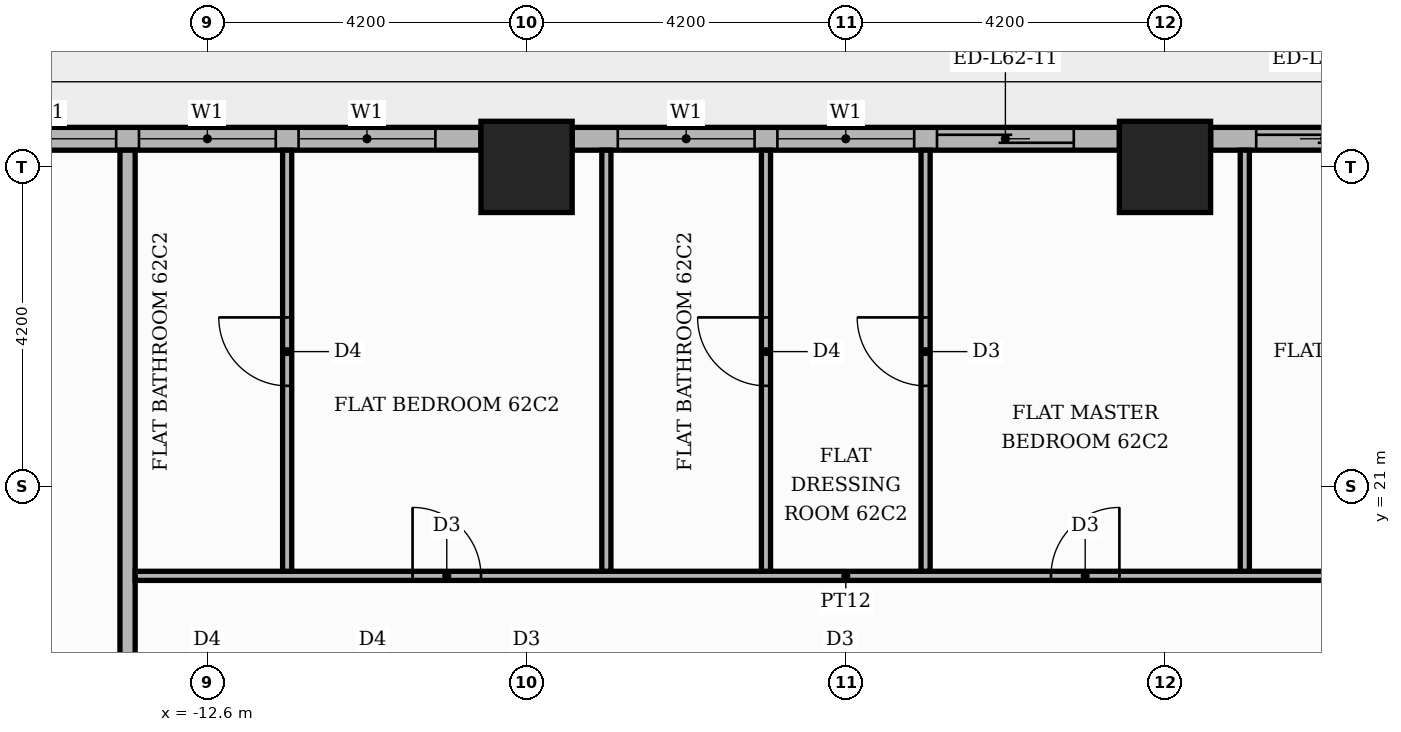
"""IFC4 building model, lengths in metres.
Left out: names, types, materials, properties, quantities, classifications, styles, units other than length and angle.
Written with IfcOpenShell. Run it as: python <this file> out.ifc"""

import sys

from ifc_helpers import new_model, si_unit, direction, frame, frame_2d, origin, origin_2d, place, context, subcontext, project, spatial, rectangle, extrude, element, fill, save


model = new_model("IFC4")
c1 = context("Model", 3, precision=1e-05, world=origin(), true_north=direction((0.0, 1.0)))
c2 = subcontext(c1, "Body", "Model", "MODEL_VIEW")
j1 = project(units=[si_unit("LENGTHUNIT", "METRE"), si_unit("PLANEANGLEUNIT", "RADIAN")], contexts=[c1])
p1 = place(None, origin())
s1 = spatial("IfcSite", under=j1, at=p1, CompositionType="ELEMENT")
p2 = place(p1, origin())
s2 = spatial("IfcBuilding", under=s1, at=p2, CompositionType="ELEMENT")
p3 = place(p2, frame((0.0, 0.0, 260.1)))
s3 = spatial("IfcBuildingStorey", under=s2, at=p3, CompositionType="ELEMENT", Elevation=260.1)
for number, where, z_axis, x_axis in (
    (1, (0.0, 25.2, 0.0), (0.0, 0.0, 1.0), (1.0, 0.0, 0.0)),
    (2, (-8.4, 25.2, 0.0), (0.0, 0.0, 1.0), (1.0, 0.0, 0.0)),
):
    element("IfcColumn", number, at=place(p3, frame(where, z_axis=z_axis, x_axis=x_axis)), inside=s3, PredefinedType="COLUMN", context=c2, shape_type="SweptSolid", body=[
        extrude(rectangle(XDim=1.2, YDim=1.2, at=origin_2d()), origin(), (0.0, 0.0, 1.0), 3.9),
    ])
p4 = place(p3, frame((7.8, 25.57, 0.0), z_axis=(0.0, 0.0, 1.0), x_axis=(-1.0, 0.0, 0.0)))
e3 = element("IfcWall", 3, at=p4, inside=s3, PredefinedType="STANDARD", context=c2, shape_type="SweptSolid", body=[
    extrude(rectangle(XDim=7.2, YDim=0.3, at=frame_2d((3.6, 0.0))), origin(), (0.0, 0.0, 1.0), 3.48),
])
p5 = place(p4, frame((0.6, 0.0, 0.9)))
e4 = element("IfcOpeningElement", 4, at=p5, cuts=e3, PredefinedType="OPENING", context=c2, shape_type="SweptSolid", body=[
    extrude(rectangle(XDim=1.8, YDim=2.1, at=frame_2d((0.9, 1.05))), frame((0.0, 0.16, 0.0), z_axis=(0.0, -1.0, 0.0), x_axis=(1.0, 0.0, 0.0)), (0.0, 0.0, 1.0), 0.32),
])
p6 = place(p4, frame((2.7, 0.0, 0.9)))
e5 = element("IfcOpeningElement", 5, at=p6, cuts=e3, PredefinedType="OPENING", context=c2, shape_type="SweptSolid", body=[
    extrude(rectangle(XDim=1.8, YDim=2.1, at=frame_2d((0.9, 1.05))), frame((0.0, 0.16, 0.0), z_axis=(0.0, -1.0, 0.0), x_axis=(1.0, 0.0, 0.0)), (0.0, 0.0, 1.0), 0.32),
])
p7 = place(p4, frame((4.8, 0.0, 0.0)))
e6 = element("IfcOpeningElement", 6, at=p7, cuts=e3, PredefinedType="OPENING", context=c2, shape_type="SweptSolid", body=[
    extrude(rectangle(XDim=1.8, YDim=2.4, at=frame_2d((0.9, 1.2))), frame((0.0, 0.16, 0.0), z_axis=(0.0, -1.0, 0.0), x_axis=(1.0, 0.0, 0.0)), (0.0, 0.0, 1.0), 0.32),
])
p8 = place(p3, frame((-0.6, 25.57, 0.0), z_axis=(0.0, 0.0, 1.0), x_axis=(-1.0, 0.0, 0.0)))
e7 = element("IfcWall", 7, at=p8, inside=s3, PredefinedType="STANDARD", context=c2, shape_type="SweptSolid", body=[
    extrude(rectangle(XDim=7.2, YDim=0.3, at=frame_2d((3.6, 0.0))), origin(), (0.0, 0.0, 1.0), 3.48),
])
p9 = place(p8, frame((0.6, 0.0, 0.0)))
e8 = element("IfcOpeningElement", 8, at=p9, cuts=e7, PredefinedType="OPENING", context=c2, shape_type="SweptSolid", body=[
    extrude(rectangle(XDim=1.8, YDim=2.4, at=frame_2d((0.9, 1.2))), frame((0.0, 0.16, 0.0), z_axis=(0.0, -1.0, 0.0), x_axis=(1.0, 0.0, 0.0)), (0.0, 0.0, 1.0), 0.32),
])
p10 = place(p8, frame((2.7, 0.0, 0.9)))
e9 = element("IfcOpeningElement", 9, at=p10, cuts=e7, PredefinedType="OPENING", context=c2, shape_type="SweptSolid", body=[
    extrude(rectangle(XDim=1.8, YDim=2.1, at=frame_2d((0.9, 1.05))), frame((0.0, 0.16, 0.0), z_axis=(0.0, -1.0, 0.0), x_axis=(1.0, 0.0, 0.0)), (0.0, 0.0, 1.0), 0.32),
])
p11 = place(p8, frame((4.8, 0.0, 0.9)))
e10 = element("IfcOpeningElement", 10, at=p11, cuts=e7, PredefinedType="OPENING", context=c2, shape_type="SweptSolid", body=[
    extrude(rectangle(XDim=1.8, YDim=2.1, at=frame_2d((0.9, 1.05))), frame((0.0, 0.16, 0.0), z_axis=(0.0, -1.0, 0.0), x_axis=(1.0, 0.0, 0.0)), (0.0, 0.0, 1.0), 0.32),
])
p12 = place(p3, frame((-9.0, 25.57, 0.0), z_axis=(0.0, 0.0, 1.0), x_axis=(-1.0, 0.0, 0.0)))
e11 = element("IfcWall", 11, at=p12, inside=s3, PredefinedType="STANDARD", context=c2, shape_type="SweptSolid", body=[
    extrude(rectangle(XDim=7.2, YDim=0.3, at=frame_2d((3.6, 0.0))), origin(), (0.0, 0.0, 1.0), 3.48),
])
p13 = place(p12, frame((0.6, 0.0, 0.9)))
e12 = element("IfcOpeningElement", 12, at=p13, cuts=e11, PredefinedType="OPENING", context=c2, shape_type="SweptSolid", body=[
    extrude(rectangle(XDim=1.8, YDim=2.1, at=frame_2d((0.9, 1.05))), frame((0.0, 0.16, 0.0), z_axis=(0.0, -1.0, 0.0), x_axis=(1.0, 0.0, 0.0)), (0.0, 0.0, 1.0), 0.32),
])
p14 = place(p12, frame((2.7, 0.0, 0.9)))
e13 = element("IfcOpeningElement", 13, at=p14, cuts=e11, PredefinedType="OPENING", context=c2, shape_type="SweptSolid", body=[
    extrude(rectangle(XDim=1.8, YDim=2.1, at=frame_2d((0.9, 1.05))), frame((0.0, 0.16, 0.0), z_axis=(0.0, -1.0, 0.0), x_axis=(1.0, 0.0, 0.0)), (0.0, 0.0, 1.0), 0.32),
])
p15 = place(p12, frame((4.8, 0.0, 0.9)))
e14 = element("IfcOpeningElement", 14, at=p15, cuts=e11, PredefinedType="OPENING", context=c2, shape_type="SweptSolid", body=[
    extrude(rectangle(XDim=1.8, YDim=2.1, at=frame_2d((0.9, 1.05))), frame((0.0, 0.16, 0.0), z_axis=(0.0, -1.0, 0.0), x_axis=(1.0, 0.0, 0.0)), (0.0, 0.0, 1.0), 0.32),
])
p16 = place(p3, frame((-13.65, 13.75, 0.0), z_axis=(0.0, 0.0, 1.0), x_axis=(0.0, 1.0, 0.0)))
e15 = element("IfcWall", 15, at=p16, inside=s3, PredefinedType="PARTITIONING", context=c2, shape_type="SweptSolid", body=[
    extrude(rectangle(XDim=11.67, YDim=0.2, at=frame_2d((5.835, 0.0))), origin(), (0.0, 0.0, 1.0), 3.48),
])
p17 = place(p3, frame((-13.55, 19.82, 0.0), z_axis=(0.0, 0.0, 1.0), x_axis=(1.0, 0.0, 0.0)))
e16 = element("IfcWall", 16, at=p17, inside=s3, PredefinedType="PARTITIONING", context=c2, shape_type="SweptSolid", body=[
    extrude(rectangle(XDim=18.7, YDim=0.12, at=frame_2d((9.35, 0.0))), origin(), (0.0, 0.0, 1.0), 3.48),
])
p18 = place(p17, frame((16.2, 0.0, 0.0)))
e17 = element("IfcOpeningElement", 17, at=p18, cuts=e16, PredefinedType="OPENING", context=c2, shape_type="SweptSolid", body=[
    extrude(rectangle(XDim=1.0, YDim=2.1, at=frame_2d((0.5, 1.05))), frame((0.0, 0.07, 0.0), z_axis=(0.0, -1.0, 0.0), x_axis=(1.0, 0.0, 0.0)), (0.0, 0.0, 1.0), 0.14),
])
p19 = place(p17, frame((12.05, 0.0, 0.0)))
e18 = element("IfcOpeningElement", 18, at=p19, cuts=e16, PredefinedType="OPENING", context=c2, shape_type="SweptSolid", body=[
    extrude(rectangle(XDim=0.9, YDim=2.1, at=frame_2d((0.45, 1.05))), frame((0.0, 0.07, 0.0), z_axis=(0.0, -1.0, 0.0), x_axis=(1.0, 0.0, 0.0)), (0.0, 0.0, 1.0), 0.14),
])
p20 = place(p17, frame((3.65, 0.0, 0.0)))
e19 = element("IfcOpeningElement", 19, at=p20, cuts=e16, PredefinedType="OPENING", context=c2, shape_type="SweptSolid", body=[
    extrude(rectangle(XDim=0.9, YDim=2.1, at=frame_2d((0.45, 1.05))), frame((0.0, 0.07, 0.0), z_axis=(0.0, -1.0, 0.0), x_axis=(1.0, 0.0, 0.0)), (0.0, 0.0, 1.0), 0.14),
])
p21 = place(p3, frame((-11.55, 19.88, 0.0), z_axis=(0.0, 0.0, 1.0), x_axis=(0.0, 1.0, 0.0)))
e20 = element("IfcWall", 20, at=p21, inside=s3, PredefinedType="PARTITIONING", context=c2, shape_type="SweptSolid", body=[
    extrude(rectangle(XDim=5.54, YDim=0.12, at=frame_2d((2.77, 0.0))), origin(), (0.0, 0.0, 1.0), 3.48),
])
p22 = place(p21, frame((2.44, 0.0, 0.0)))
e21 = element("IfcOpeningElement", 21, at=p22, cuts=e20, PredefinedType="OPENING", context=c2, shape_type="SweptSolid", body=[
    extrude(rectangle(XDim=0.9, YDim=2.1, at=frame_2d((0.45, 1.05))), frame((0.0, 0.07, 0.0), z_axis=(0.0, -1.0, 0.0), x_axis=(1.0, 0.0, 0.0)), (0.0, 0.0, 1.0), 0.14),
])
p23 = place(p3, frame((-7.35, 19.88, 0.0), z_axis=(0.0, 0.0, 1.0), x_axis=(0.0, 1.0, 0.0)))
e22 = element("IfcWall", 22, at=p23, inside=s3, PredefinedType="PARTITIONING", context=c2, shape_type="SweptSolid", body=[
    extrude(rectangle(XDim=5.54, YDim=0.12, at=frame_2d((2.77, 0.0))), origin(), (0.0, 0.0, 1.0), 3.48),
])
p24 = place(p3, frame((-5.25, 19.88, 0.0), z_axis=(0.0, 0.0, 1.0), x_axis=(0.0, 1.0, 0.0)))
e23 = element("IfcWall", 23, at=p24, inside=s3, PredefinedType="PARTITIONING", context=c2, shape_type="SweptSolid", body=[
    extrude(rectangle(XDim=5.54, YDim=0.12, at=frame_2d((2.77, 0.0))), origin(), (0.0, 0.0, 1.0), 3.48),
])
p25 = place(p24, frame((2.44, 0.0, 0.0)))
e24 = element("IfcOpeningElement", 24, at=p25, cuts=e23, PredefinedType="OPENING", context=c2, shape_type="SweptSolid", body=[
    extrude(rectangle(XDim=0.9, YDim=2.1, at=frame_2d((0.45, 1.05))), frame((0.0, 0.07, 0.0), z_axis=(0.0, -1.0, 0.0), x_axis=(1.0, 0.0, 0.0)), (0.0, 0.0, 1.0), 0.14),
])
p26 = place(p3, frame((-3.15, 19.88, 0.0), z_axis=(0.0, 0.0, 1.0), x_axis=(0.0, 1.0, 0.0)))
e25 = element("IfcWall", 25, at=p26, inside=s3, PredefinedType="PARTITIONING", context=c2, shape_type="SweptSolid", body=[
    extrude(rectangle(XDim=5.54, YDim=0.12, at=frame_2d((2.77, 0.0))), origin(), (0.0, 0.0, 1.0), 3.48),
])
p27 = place(p26, frame((2.44, 0.0, 0.0)))
e26 = element("IfcOpeningElement", 26, at=p27, cuts=e25, PredefinedType="OPENING", context=c2, shape_type="SweptSolid", body=[
    extrude(rectangle(XDim=0.9, YDim=2.1, at=frame_2d((0.45, 1.05))), frame((0.0, 0.07, 0.0), z_axis=(0.0, -1.0, 0.0), x_axis=(1.0, 0.0, 0.0)), (0.0, 0.0, 1.0), 0.14),
])
p28 = place(p3, frame((1.05, 19.88, 0.0), z_axis=(0.0, 0.0, 1.0), x_axis=(0.0, 1.0, 0.0)))
e27 = element("IfcWall", 27, at=p28, inside=s3, PredefinedType="PARTITIONING", context=c2, shape_type="SweptSolid", body=[
    extrude(rectangle(XDim=5.54, YDim=0.12, at=frame_2d((2.77, 0.0))), origin(), (0.0, 0.0, 1.0), 3.48),
])
p29 = place(p7, origin())
e28 = element("IfcDoor", 28, at=p29, inside=s3, OperationType="SLIDING_TO_RIGHT", PredefinedType="DOOR", context=c2, shape_type="SweptSolid", body=[
    extrude(rectangle(XDim=1.8, YDim=2.4, at=frame_2d((0.9, 1.2))), frame((0.0, 0.025, 0.0), z_axis=(0.0, -1.0, 0.0), x_axis=(1.0, 0.0, 0.0)), (0.0, 0.0, 1.0), 0.05),
])
fill(e6, e28)
p30 = place(p9, origin())
e29 = element("IfcDoor", 29, at=p30, inside=s3, OperationType="SLIDING_TO_LEFT", PredefinedType="DOOR", context=c2, shape_type="SweptSolid", body=[
    extrude(rectangle(XDim=1.8, YDim=2.4, at=frame_2d((0.9, 1.2))), frame((0.0, 0.025, 0.0), z_axis=(0.0, -1.0, 0.0), x_axis=(1.0, 0.0, 0.0)), (0.0, 0.0, 1.0), 0.05),
])
fill(e8, e29)
p31 = place(p10, origin())
e30 = element("IfcWindow", 30, at=p31, inside=s3, PartitioningType="SINGLE_PANEL", PredefinedType="WINDOW", context=c2, shape_type="SweptSolid", body=[
    extrude(rectangle(XDim=1.8, YDim=2.1, at=frame_2d((0.9, 1.05))), frame((0.0, 0.03, 0.0), z_axis=(0.0, -1.0, 0.0), x_axis=(1.0, 0.0, 0.0)), (0.0, 0.0, 1.0), 0.06),
])
fill(e9, e30)
p32 = place(p11, origin())
e31 = element("IfcWindow", 31, at=p32, inside=s3, PartitioningType="SINGLE_PANEL", PredefinedType="WINDOW", context=c2, shape_type="SweptSolid", body=[
    extrude(rectangle(XDim=1.8, YDim=2.1, at=frame_2d((0.9, 1.05))), frame((0.0, 0.03, 0.0), z_axis=(0.0, -1.0, 0.0), x_axis=(1.0, 0.0, 0.0)), (0.0, 0.0, 1.0), 0.06),
])
fill(e10, e31)
p33 = place(p13, origin())
e32 = element("IfcWindow", 32, at=p33, inside=s3, PartitioningType="SINGLE_PANEL", PredefinedType="WINDOW", context=c2, shape_type="SweptSolid", body=[
    extrude(rectangle(XDim=1.8, YDim=2.1, at=frame_2d((0.9, 1.05))), frame((0.0, 0.03, 0.0), z_axis=(0.0, -1.0, 0.0), x_axis=(1.0, 0.0, 0.0)), (0.0, 0.0, 1.0), 0.06),
])
fill(e12, e32)
p34 = place(p14, origin())
e33 = element("IfcWindow", 33, at=p34, inside=s3, PartitioningType="SINGLE_PANEL", PredefinedType="WINDOW", context=c2, shape_type="SweptSolid", body=[
    extrude(rectangle(XDim=1.8, YDim=2.1, at=frame_2d((0.9, 1.05))), frame((0.0, 0.03, 0.0), z_axis=(0.0, -1.0, 0.0), x_axis=(1.0, 0.0, 0.0)), (0.0, 0.0, 1.0), 0.06),
])
fill(e13, e33)
p35 = place(p15, origin())
e34 = element("IfcWindow", 34, at=p35, inside=s3, PartitioningType="SINGLE_PANEL", PredefinedType="WINDOW", context=c2, shape_type="SweptSolid", body=[
    extrude(rectangle(XDim=1.8, YDim=2.1, at=frame_2d((0.9, 1.05))), frame((0.0, 0.03, 0.0), z_axis=(0.0, -1.0, 0.0), x_axis=(1.0, 0.0, 0.0)), (0.0, 0.0, 1.0), 0.06),
])
fill(e14, e34)
p36 = place(p19, origin())
e35 = element("IfcDoor", 35, at=p36, inside=s3, OperationType="SINGLE_SWING_RIGHT", PredefinedType="DOOR", context=c2, shape_type="SweptSolid", body=[
    extrude(rectangle(XDim=0.9, YDim=2.1, at=frame_2d((0.45, 1.05))), frame((0.0, 0.025, 0.0), z_axis=(0.0, -1.0, 0.0), x_axis=(1.0, 0.0, 0.0)), (0.0, 0.0, 1.0), 0.05),
])
fill(e18, e35)
p37 = place(p27, origin())
e36 = element("IfcDoor", 36, at=p37, inside=s3, OperationType="SINGLE_SWING_RIGHT", PredefinedType="DOOR", context=c2, shape_type="SweptSolid", body=[
    extrude(rectangle(XDim=0.9, YDim=2.1, at=frame_2d((0.45, 1.05))), frame((0.0, 0.025, 0.0), z_axis=(0.0, -1.0, 0.0), x_axis=(1.0, 0.0, 0.0)), (0.0, 0.0, 1.0), 0.05),
])
fill(e26, e36)
p38 = place(p25, origin())
e37 = element("IfcDoor", 37, at=p38, inside=s3, OperationType="SINGLE_SWING_RIGHT", PredefinedType="DOOR", context=c2, shape_type="SweptSolid", body=[
    extrude(rectangle(XDim=0.9, YDim=2.1, at=frame_2d((0.45, 1.05))), frame((0.0, 0.025, 0.0), z_axis=(0.0, -1.0, 0.0), x_axis=(1.0, 0.0, 0.0)), (0.0, 0.0, 1.0), 0.05),
])
fill(e24, e37)
p39 = place(p20, origin())
e38 = element("IfcDoor", 38, at=p39, inside=s3, OperationType="SINGLE_SWING_LEFT", PredefinedType="DOOR", context=c2, shape_type="SweptSolid", body=[
    extrude(rectangle(XDim=0.9, YDim=2.1, at=frame_2d((0.45, 1.05))), frame((0.0, 0.025, 0.0), z_axis=(0.0, -1.0, 0.0), x_axis=(1.0, 0.0, 0.0)), (0.0, 0.0, 1.0), 0.05),
])
fill(e19, e38)
p40 = place(p22, origin())
e39 = element("IfcDoor", 39, at=p40, inside=s3, OperationType="SINGLE_SWING_RIGHT", PredefinedType="DOOR", context=c2, shape_type="SweptSolid", body=[
    extrude(rectangle(XDim=0.9, YDim=2.1, at=frame_2d((0.45, 1.05))), frame((0.0, 0.025, 0.0), z_axis=(0.0, -1.0, 0.0), x_axis=(1.0, 0.0, 0.0)), (0.0, 0.0, 1.0), 0.05),
])
fill(e21, e39)
save(model, sys.argv[1])
